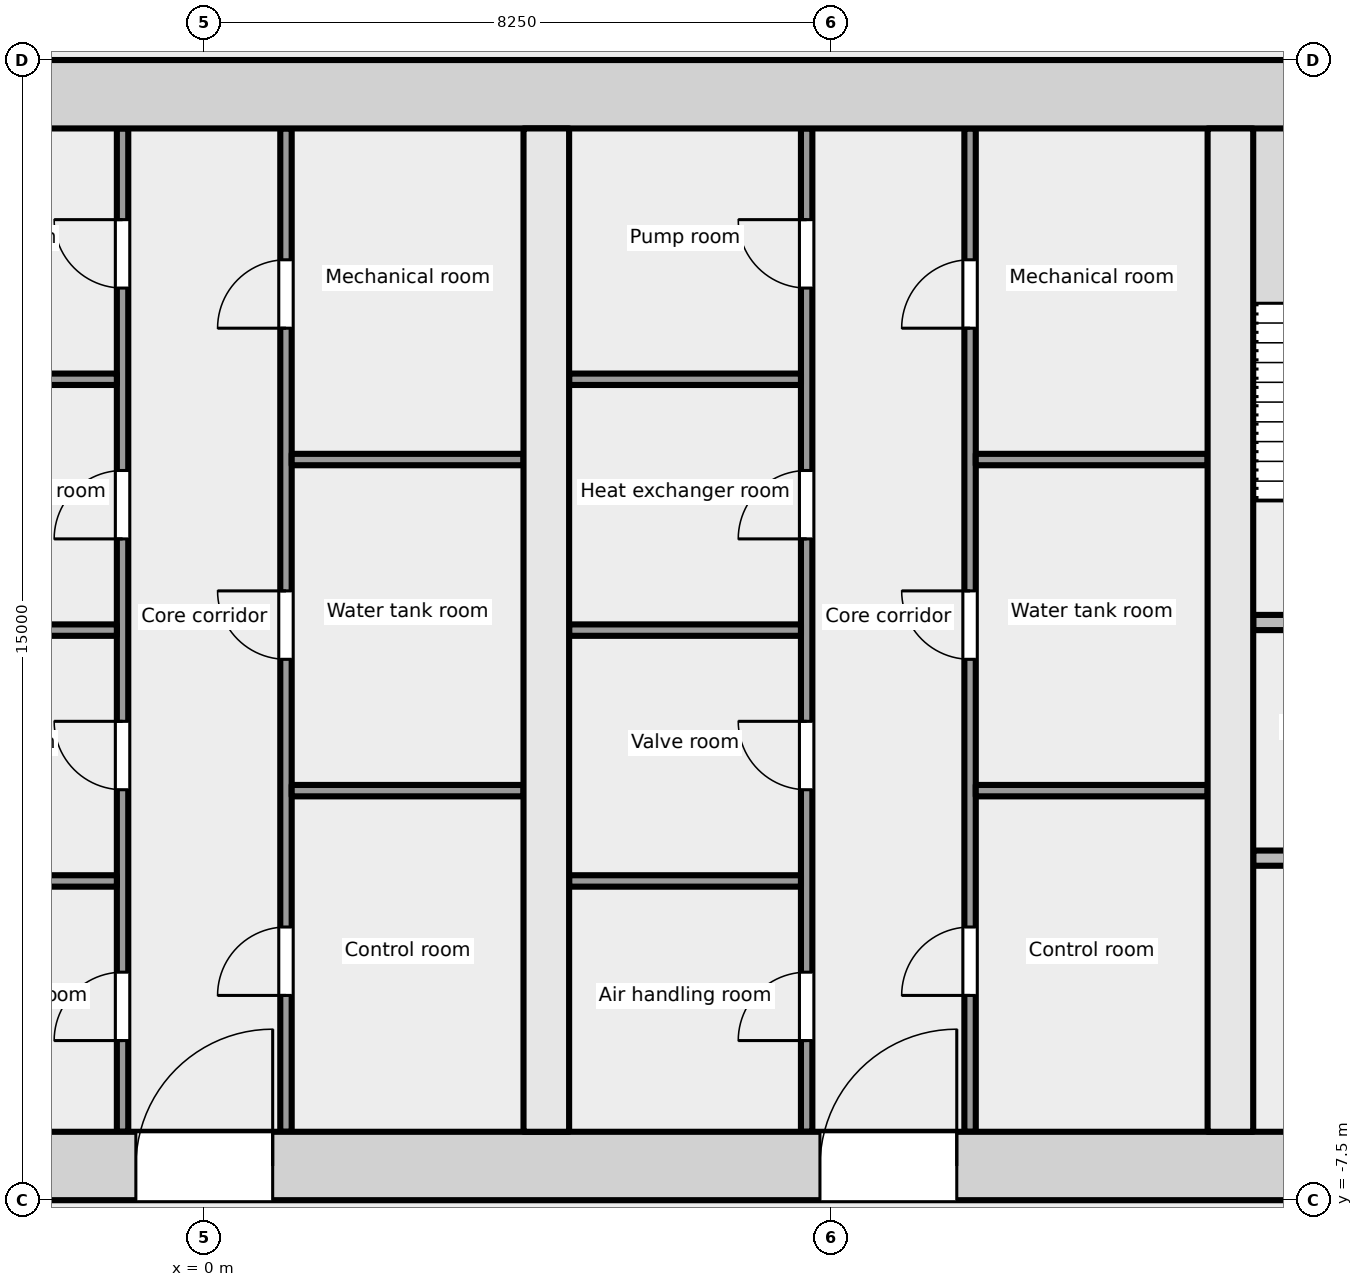
"""IFC4 building model, lengths in metres.
Left out: names, types, materials, properties, quantities, classifications, styles, units other than length and angle.
Written with IfcOpenShell. Run it as: python <this file> out.ifc"""

import sys

from ifc_helpers import new_model, si_unit, direction, frame, frame_2d, origin, place, context, subcontext, project, spatial, rectangle, extrude, element, fill, save


model = new_model("IFC4")
c1 = context("Model", 3, precision=1e-05, world=origin(), true_north=direction((0.0, 1.0)))
c2 = subcontext(c1, "Body", "Model", "MODEL_VIEW")
j1 = project(units=[si_unit("LENGTHUNIT", "METRE"), si_unit("PLANEANGLEUNIT", "RADIAN")], contexts=[c1])
p1 = place(None, origin())
s1 = spatial("IfcSite", under=j1, at=p1, CompositionType="ELEMENT")
p2 = place(p1, origin())
s2 = spatial("IfcBuilding", under=s1, at=p2, CompositionType="ELEMENT")
p3 = place(p2, frame((0.0, 0.0, 292.3)))
s3 = spatial("IfcBuildingStorey", under=s2, at=p3, CompositionType="ELEMENT", Elevation=292.3)
p4 = place(p3, frame((-18.0, -7.05, -0.2), z_axis=(0.0, 0.0, 1.0), x_axis=(1.0, 0.0, 0.0)))
e1 = element("IfcWall", 1, at=p4, inside=s3, PredefinedType="SHEAR", context=c2, shape_type="SweptSolid", body=[
    extrude(rectangle(XDim=36.0, YDim=0.9, at=frame_2d((18.0, 0.0))), origin(), (0.0, 0.0, 1.0), 4.0),
])
p5 = place(p4, frame((8.1, 0.0, 0.2)))
e2 = element("IfcOpeningElement", 2, at=p5, cuts=e1, PredefinedType="OPENING", context=c2, shape_type="SweptSolid", body=[
    extrude(rectangle(XDim=1.8, YDim=2.1, at=frame_2d((0.9, 1.05))), frame((0.0, 0.46, 0.0), z_axis=(0.0, -1.0, 0.0), x_axis=(1.0, 0.0, 0.0)), (0.0, 0.0, 1.0), 0.921),
])
p6 = place(p4, frame((17.1, 0.0, 0.2)))
e3 = element("IfcOpeningElement", 3, at=p6, cuts=e1, PredefinedType="OPENING", context=c2, shape_type="SweptSolid", body=[
    extrude(rectangle(XDim=1.8, YDim=2.1, at=frame_2d((0.9, 1.05))), frame((0.0, 0.46, 0.0), z_axis=(0.0, -1.0, 0.0), x_axis=(1.0, 0.0, 0.0)), (0.0, 0.0, 1.0), 0.921),
])
p7 = place(p4, frame((26.1, 0.0, 0.2)))
e4 = element("IfcOpeningElement", 4, at=p7, cuts=e1, PredefinedType="OPENING", context=c2, shape_type="SweptSolid", body=[
    extrude(rectangle(XDim=1.8, YDim=2.1, at=frame_2d((0.9, 1.05))), frame((0.0, 0.46, 0.0), z_axis=(0.0, -1.0, 0.0), x_axis=(1.0, 0.0, 0.0)), (0.0, 0.0, 1.0), 0.921),
])
p8 = place(p3, frame((-18.0, 7.05, -0.2), z_axis=(0.0, 0.0, 1.0), x_axis=(1.0, 0.0, 0.0)))
e5 = element("IfcWall", 5, at=p8, inside=s3, PredefinedType="SHEAR", context=c2, shape_type="SweptSolid", body=[
    extrude(rectangle(XDim=36.0, YDim=0.9, at=frame_2d((18.0, 0.0))), origin(), (0.0, 0.0, 1.0), 4.0),
])
for number, where, z_axis, x_axis in (
    (6, (4.5, -6.6, -0.2), (0.0, 0.0, 1.0), (0.0, 1.0, 0.0)),
    (7, (13.5, -6.6, -0.2), (0.0, 0.0, 1.0), (0.0, 1.0, 0.0)),
):
    element("IfcWall", number, at=place(p3, frame(where, z_axis=z_axis, x_axis=x_axis)), inside=s3, PredefinedType="SHEAR", context=c2, shape_type="SweptSolid", body=[
        extrude(rectangle(XDim=13.2, YDim=0.6, at=frame_2d((6.6, 0.0))), origin(), (0.0, 0.0, 1.0), 4.0),
    ])
p9 = place(p3, frame((13.8, -3.0, 0.0), z_axis=(0.0, 0.0, 1.0), x_axis=(1.0, 0.0, 0.0)))
e8 = element("IfcWall", 8, at=p9, inside=s3, PredefinedType="PARTITIONING", context=c2, shape_type="SweptSolid", body=[
    extrude(rectangle(XDim=3.3, YDim=0.2, at=frame_2d((1.65, 0.0))), origin(), (0.0, 0.0, 1.0), 3.8),
])
p10 = place(p9, frame((1.1, 0.0, 0.0)))
e9 = element("IfcOpeningElement", 9, at=p10, cuts=e8, PredefinedType="OPENING", context=c2, shape_type="SweptSolid", body=[
    extrude(rectangle(XDim=1.1, YDim=2.1, at=frame_2d((0.55, 1.05))), frame((0.0, 0.111, 0.0), z_axis=(0.0, -1.0, 0.0), x_axis=(1.0, 0.0, 0.0)), (0.0, 0.0, 1.0), 0.221),
])
p11 = place(p3, frame((13.8, 0.1, 0.0), z_axis=(0.0, 0.0, 1.0), x_axis=(1.0, 0.0, 0.0)))
e10 = element("IfcWall", 10, at=p11, inside=s3, PredefinedType="PARTITIONING", context=c2, shape_type="SweptSolid", body=[
    extrude(rectangle(XDim=3.3, YDim=0.2, at=frame_2d((1.65, 0.0))), origin(), (0.0, 0.0, 1.0), 3.8),
])
p12 = place(p11, frame((1.1, 0.0, 0.0)))
e11 = element("IfcOpeningElement", 11, at=p12, cuts=e10, PredefinedType="OPENING", context=c2, shape_type="SweptSolid", body=[
    extrude(rectangle(XDim=1.1, YDim=2.1, at=frame_2d((0.55, 1.05))), frame((0.0, 0.111, 0.0), z_axis=(0.0, -1.0, 0.0), x_axis=(1.0, 0.0, 0.0)), (0.0, 0.0, 1.0), 0.221),
])
p13 = place(p3, frame((-1.075, -6.6, 0.0), z_axis=(0.0, 0.0, 1.0), x_axis=(0.0, 1.0, 0.0)))
e12 = element("IfcWall", 12, at=p13, inside=s3, PredefinedType="PARTITIONING", context=c2, shape_type="SweptSolid", body=[
    extrude(rectangle(XDim=13.2, YDim=0.15, at=frame_2d((6.6, 0.0))), origin(), (0.0, 0.0, 1.0), 3.8),
])
p14 = place(p13, frame((1.2, 0.0, 0.0)))
e13 = element("IfcOpeningElement", 13, at=p14, cuts=e12, PredefinedType="OPENING", context=c2, shape_type="SweptSolid", body=[
    extrude(rectangle(XDim=0.9, YDim=2.1, at=frame_2d((0.45, 1.05))), frame((0.0, 0.085, 0.0), z_axis=(0.0, -1.0, 0.0), x_axis=(1.0, 0.0, 0.0)), (0.0, 0.0, 1.0), 0.171),
])
p15 = place(p13, frame((4.5, 0.0, 0.0)))
e14 = element("IfcOpeningElement", 14, at=p15, cuts=e12, PredefinedType="OPENING", context=c2, shape_type="SweptSolid", body=[
    extrude(rectangle(XDim=0.9, YDim=2.1, at=frame_2d((0.45, 1.05))), frame((0.0, 0.085, 0.0), z_axis=(0.0, -1.0, 0.0), x_axis=(1.0, 0.0, 0.0)), (0.0, 0.0, 1.0), 0.171),
])
p16 = place(p13, frame((7.8, 0.0, 0.0)))
e15 = element("IfcOpeningElement", 15, at=p16, cuts=e12, PredefinedType="OPENING", context=c2, shape_type="SweptSolid", body=[
    extrude(rectangle(XDim=0.9, YDim=2.1, at=frame_2d((0.45, 1.05))), frame((0.0, 0.085, 0.0), z_axis=(0.0, -1.0, 0.0), x_axis=(1.0, 0.0, 0.0)), (0.0, 0.0, 1.0), 0.171),
])
p17 = place(p13, frame((11.1, 0.0, 0.0)))
e16 = element("IfcOpeningElement", 16, at=p17, cuts=e12, PredefinedType="OPENING", context=c2, shape_type="SweptSolid", body=[
    extrude(rectangle(XDim=0.9, YDim=2.1, at=frame_2d((0.45, 1.05))), frame((0.0, 0.085, 0.0), z_axis=(0.0, -1.0, 0.0), x_axis=(1.0, 0.0, 0.0)), (0.0, 0.0, 1.0), 0.171),
])
for number, where, z_axis, x_axis in (
    (17, (-4.2, -3.3, 0.0), (0.0, 0.0, 1.0), (1.0, 0.0, 0.0)),
    (18, (-4.2, 0.0, 0.0), (0.0, 0.0, 1.0), (1.0, 0.0, 0.0)),
    (19, (-4.2, 3.3, 0.0), (0.0, 0.0, 1.0), (1.0, 0.0, 0.0)),
):
    element("IfcWall", number, at=place(p3, frame(where, z_axis=z_axis, x_axis=x_axis)), inside=s3, PredefinedType="PARTITIONING", context=c2, shape_type="SweptSolid", body=[
        extrude(rectangle(XDim=3.05, YDim=0.15, at=frame_2d((1.525, 0.0))), origin(), (0.0, 0.0, 1.0), 3.8),
    ])
p18 = place(p3, frame((1.075, -6.6, 0.0), z_axis=(0.0, 0.0, 1.0), x_axis=(0.0, 1.0, 0.0)))
e20 = element("IfcWall", 20, at=p18, inside=s3, PredefinedType="PARTITIONING", context=c2, shape_type="SweptSolid", body=[
    extrude(rectangle(XDim=13.2, YDim=0.15, at=frame_2d((6.6, 0.0))), origin(), (0.0, 0.0, 1.0), 3.8),
])
p19 = place(p18, frame((1.794, 0.0, 0.0)))
e21 = element("IfcOpeningElement", 21, at=p19, cuts=e20, PredefinedType="OPENING", context=c2, shape_type="SweptSolid", body=[
    extrude(rectangle(XDim=0.9, YDim=2.1, at=frame_2d((0.45, 1.05))), frame((0.0, 0.085, 0.0), z_axis=(0.0, -1.0, 0.0), x_axis=(1.0, 0.0, 0.0)), (0.0, 0.0, 1.0), 0.171),
])
p20 = place(p18, frame((6.216, 0.0, 0.0)))
e22 = element("IfcOpeningElement", 22, at=p20, cuts=e20, PredefinedType="OPENING", context=c2, shape_type="SweptSolid", body=[
    extrude(rectangle(XDim=0.9, YDim=2.1, at=frame_2d((0.45, 1.05))), frame((0.0, 0.085, 0.0), z_axis=(0.0, -1.0, 0.0), x_axis=(1.0, 0.0, 0.0)), (0.0, 0.0, 1.0), 0.171),
])
p21 = place(p18, frame((10.572, 0.0, 0.0)))
e23 = element("IfcOpeningElement", 23, at=p21, cuts=e20, PredefinedType="OPENING", context=c2, shape_type="SweptSolid", body=[
    extrude(rectangle(XDim=0.9, YDim=2.1, at=frame_2d((0.45, 1.05))), frame((0.0, 0.085, 0.0), z_axis=(0.0, -1.0, 0.0), x_axis=(1.0, 0.0, 0.0)), (0.0, 0.0, 1.0), 0.171),
])
for number, where, z_axis, x_axis in (
    (24, (1.15, -2.112, 0.0), (0.0, 0.0, 1.0), (1.0, 0.0, 0.0)),
    (25, (1.15, 2.244, 0.0), (0.0, 0.0, 1.0), (1.0, 0.0, 0.0)),
):
    element("IfcWall", number, at=place(p3, frame(where, z_axis=z_axis, x_axis=x_axis)), inside=s3, PredefinedType="PARTITIONING", context=c2, shape_type="SweptSolid", body=[
        extrude(rectangle(XDim=3.05, YDim=0.15, at=frame_2d((1.525, 0.0))), origin(), (0.0, 0.0, 1.0), 3.8),
    ])
p22 = place(p3, frame((7.925, -6.6, 0.0), z_axis=(0.0, 0.0, 1.0), x_axis=(0.0, 1.0, 0.0)))
e26 = element("IfcWall", 26, at=p22, inside=s3, PredefinedType="PARTITIONING", context=c2, shape_type="SweptSolid", body=[
    extrude(rectangle(XDim=13.2, YDim=0.15, at=frame_2d((6.6, 0.0))), origin(), (0.0, 0.0, 1.0), 3.8),
])
p23 = place(p22, frame((1.2, 0.0, 0.0)))
e27 = element("IfcOpeningElement", 27, at=p23, cuts=e26, PredefinedType="OPENING", context=c2, shape_type="SweptSolid", body=[
    extrude(rectangle(XDim=0.9, YDim=2.1, at=frame_2d((0.45, 1.05))), frame((0.0, 0.085, 0.0), z_axis=(0.0, -1.0, 0.0), x_axis=(1.0, 0.0, 0.0)), (0.0, 0.0, 1.0), 0.171),
])
p24 = place(p22, frame((4.5, 0.0, 0.0)))
e28 = element("IfcOpeningElement", 28, at=p24, cuts=e26, PredefinedType="OPENING", context=c2, shape_type="SweptSolid", body=[
    extrude(rectangle(XDim=0.9, YDim=2.1, at=frame_2d((0.45, 1.05))), frame((0.0, 0.085, 0.0), z_axis=(0.0, -1.0, 0.0), x_axis=(1.0, 0.0, 0.0)), (0.0, 0.0, 1.0), 0.171),
])
p25 = place(p22, frame((7.8, 0.0, 0.0)))
e29 = element("IfcOpeningElement", 29, at=p25, cuts=e26, PredefinedType="OPENING", context=c2, shape_type="SweptSolid", body=[
    extrude(rectangle(XDim=0.9, YDim=2.1, at=frame_2d((0.45, 1.05))), frame((0.0, 0.085, 0.0), z_axis=(0.0, -1.0, 0.0), x_axis=(1.0, 0.0, 0.0)), (0.0, 0.0, 1.0), 0.171),
])
p26 = place(p22, frame((11.1, 0.0, 0.0)))
e30 = element("IfcOpeningElement", 30, at=p26, cuts=e26, PredefinedType="OPENING", context=c2, shape_type="SweptSolid", body=[
    extrude(rectangle(XDim=0.9, YDim=2.1, at=frame_2d((0.45, 1.05))), frame((0.0, 0.085, 0.0), z_axis=(0.0, -1.0, 0.0), x_axis=(1.0, 0.0, 0.0)), (0.0, 0.0, 1.0), 0.171),
])
for number, where, z_axis, x_axis in (
    (31, (4.8, -3.3, 0.0), (0.0, 0.0, 1.0), (1.0, 0.0, 0.0)),
    (32, (4.8, 0.0, 0.0), (0.0, 0.0, 1.0), (1.0, 0.0, 0.0)),
    (33, (4.8, 3.3, 0.0), (0.0, 0.0, 1.0), (1.0, 0.0, 0.0)),
):
    element("IfcWall", number, at=place(p3, frame(where, z_axis=z_axis, x_axis=x_axis)), inside=s3, PredefinedType="PARTITIONING", context=c2, shape_type="SweptSolid", body=[
        extrude(rectangle(XDim=3.05, YDim=0.15, at=frame_2d((1.525, 0.0))), origin(), (0.0, 0.0, 1.0), 3.8),
    ])
p27 = place(p3, frame((10.075, -6.6, 0.0), z_axis=(0.0, 0.0, 1.0), x_axis=(0.0, 1.0, 0.0)))
e34 = element("IfcWall", 34, at=p27, inside=s3, PredefinedType="PARTITIONING", context=c2, shape_type="SweptSolid", body=[
    extrude(rectangle(XDim=13.2, YDim=0.15, at=frame_2d((6.6, 0.0))), origin(), (0.0, 0.0, 1.0), 3.8),
])
p28 = place(p27, frame((1.794, 0.0, 0.0)))
e35 = element("IfcOpeningElement", 35, at=p28, cuts=e34, PredefinedType="OPENING", context=c2, shape_type="SweptSolid", body=[
    extrude(rectangle(XDim=0.9, YDim=2.1, at=frame_2d((0.45, 1.05))), frame((0.0, 0.085, 0.0), z_axis=(0.0, -1.0, 0.0), x_axis=(1.0, 0.0, 0.0)), (0.0, 0.0, 1.0), 0.171),
])
p29 = place(p27, frame((6.216, 0.0, 0.0)))
e36 = element("IfcOpeningElement", 36, at=p29, cuts=e34, PredefinedType="OPENING", context=c2, shape_type="SweptSolid", body=[
    extrude(rectangle(XDim=0.9, YDim=2.1, at=frame_2d((0.45, 1.05))), frame((0.0, 0.085, 0.0), z_axis=(0.0, -1.0, 0.0), x_axis=(1.0, 0.0, 0.0)), (0.0, 0.0, 1.0), 0.171),
])
p30 = place(p27, frame((10.572, 0.0, 0.0)))
e37 = element("IfcOpeningElement", 37, at=p30, cuts=e34, PredefinedType="OPENING", context=c2, shape_type="SweptSolid", body=[
    extrude(rectangle(XDim=0.9, YDim=2.1, at=frame_2d((0.45, 1.05))), frame((0.0, 0.085, 0.0), z_axis=(0.0, -1.0, 0.0), x_axis=(1.0, 0.0, 0.0)), (0.0, 0.0, 1.0), 0.171),
])
for number, where, z_axis, x_axis in (
    (38, (10.15, -2.112, 0.0), (0.0, 0.0, 1.0), (1.0, 0.0, 0.0)),
    (39, (10.15, 2.244, 0.0), (0.0, 0.0, 1.0), (1.0, 0.0, 0.0)),
):
    element("IfcWall", number, at=place(p3, frame(where, z_axis=z_axis, x_axis=x_axis)), inside=s3, PredefinedType="PARTITIONING", context=c2, shape_type="SweptSolid", body=[
        extrude(rectangle(XDim=3.05, YDim=0.15, at=frame_2d((1.525, 0.0))), origin(), (0.0, 0.0, 1.0), 3.8),
    ])
p31 = place(p14, origin())
e40 = element("IfcDoor", 40, at=p31, inside=s3, OperationType="SINGLE_SWING_LEFT", PredefinedType="DOOR", context=c2, shape_type="SweptSolid", body=[
    extrude(rectangle(XDim=0.9, YDim=2.1, at=frame_2d((0.45, 1.05))), frame((0.0, 0.025, 0.0), z_axis=(0.0, -1.0, 0.0), x_axis=(1.0, 0.0, 0.0)), (0.0, 0.0, 1.0), 0.05),
])
fill(e13, e40)
p32 = place(p15, origin())
e41 = element("IfcDoor", 41, at=p32, inside=s3, OperationType="SINGLE_SWING_RIGHT", PredefinedType="DOOR", context=c2, shape_type="SweptSolid", body=[
    extrude(rectangle(XDim=0.9, YDim=2.1, at=frame_2d((0.45, 1.05))), frame((0.0, 0.025, 0.0), z_axis=(0.0, -1.0, 0.0), x_axis=(1.0, 0.0, 0.0)), (0.0, 0.0, 1.0), 0.05),
])
fill(e14, e41)
p33 = place(p16, origin())
e42 = element("IfcDoor", 42, at=p33, inside=s3, OperationType="SINGLE_SWING_LEFT", PredefinedType="DOOR", context=c2, shape_type="SweptSolid", body=[
    extrude(rectangle(XDim=0.9, YDim=2.1, at=frame_2d((0.45, 1.05))), frame((0.0, 0.025, 0.0), z_axis=(0.0, -1.0, 0.0), x_axis=(1.0, 0.0, 0.0)), (0.0, 0.0, 1.0), 0.05),
])
fill(e15, e42)
p34 = place(p17, origin())
e43 = element("IfcDoor", 43, at=p34, inside=s3, OperationType="SINGLE_SWING_RIGHT", PredefinedType="DOOR", context=c2, shape_type="SweptSolid", body=[
    extrude(rectangle(XDim=0.9, YDim=2.1, at=frame_2d((0.45, 1.05))), frame((0.0, 0.025, 0.0), z_axis=(0.0, -1.0, 0.0), x_axis=(1.0, 0.0, 0.0)), (0.0, 0.0, 1.0), 0.05),
])
fill(e16, e43)
p35 = place(p19, origin())
e44 = element("IfcDoor", 44, at=p35, inside=s3, OperationType="SINGLE_SWING_LEFT", PredefinedType="DOOR", context=c2, shape_type="SweptSolid", body=[
    extrude(rectangle(XDim=0.9, YDim=2.1, at=frame_2d((0.45, 1.05))), frame((0.0, 0.025, 0.0), z_axis=(0.0, -1.0, 0.0), x_axis=(1.0, 0.0, 0.0)), (0.0, 0.0, 1.0), 0.05),
])
fill(e21, e44)
p36 = place(p20, origin())
e45 = element("IfcDoor", 45, at=p36, inside=s3, OperationType="SINGLE_SWING_RIGHT", PredefinedType="DOOR", context=c2, shape_type="SweptSolid", body=[
    extrude(rectangle(XDim=0.9, YDim=2.1, at=frame_2d((0.45, 1.05))), frame((0.0, 0.025, 0.0), z_axis=(0.0, -1.0, 0.0), x_axis=(1.0, 0.0, 0.0)), (0.0, 0.0, 1.0), 0.05),
])
fill(e22, e45)
p37 = place(p21, origin())
e46 = element("IfcDoor", 46, at=p37, inside=s3, OperationType="SINGLE_SWING_LEFT", PredefinedType="DOOR", context=c2, shape_type="SweptSolid", body=[
    extrude(rectangle(XDim=0.9, YDim=2.1, at=frame_2d((0.45, 1.05))), frame((0.0, 0.025, 0.0), z_axis=(0.0, -1.0, 0.0), x_axis=(1.0, 0.0, 0.0)), (0.0, 0.0, 1.0), 0.05),
])
fill(e23, e46)
p38 = place(p6, origin())
e47 = element("IfcDoor", 47, at=p38, inside=s3, OperationType="SINGLE_SWING_RIGHT", PredefinedType="DOOR", context=c2, shape_type="SweptSolid", body=[
    extrude(rectangle(XDim=1.8, YDim=2.1, at=frame_2d((0.9, 1.05))), frame((0.0, 0.025, 0.0), z_axis=(0.0, -1.0, 0.0), x_axis=(1.0, 0.0, 0.0)), (0.0, 0.0, 1.0), 0.05),
])
fill(e3, e47)
p39 = place(p23, origin())
e48 = element("IfcDoor", 48, at=p39, inside=s3, OperationType="SINGLE_SWING_LEFT", PredefinedType="DOOR", context=c2, shape_type="SweptSolid", body=[
    extrude(rectangle(XDim=0.9, YDim=2.1, at=frame_2d((0.45, 1.05))), frame((0.0, 0.025, 0.0), z_axis=(0.0, -1.0, 0.0), x_axis=(1.0, 0.0, 0.0)), (0.0, 0.0, 1.0), 0.05),
])
fill(e27, e48)
p40 = place(p24, origin())
e49 = element("IfcDoor", 49, at=p40, inside=s3, OperationType="SINGLE_SWING_RIGHT", PredefinedType="DOOR", context=c2, shape_type="SweptSolid", body=[
    extrude(rectangle(XDim=0.9, YDim=2.1, at=frame_2d((0.45, 1.05))), frame((0.0, 0.025, 0.0), z_axis=(0.0, -1.0, 0.0), x_axis=(1.0, 0.0, 0.0)), (0.0, 0.0, 1.0), 0.05),
])
fill(e28, e49)
p41 = place(p25, origin())
e50 = element("IfcDoor", 50, at=p41, inside=s3, OperationType="SINGLE_SWING_LEFT", PredefinedType="DOOR", context=c2, shape_type="SweptSolid", body=[
    extrude(rectangle(XDim=0.9, YDim=2.1, at=frame_2d((0.45, 1.05))), frame((0.0, 0.025, 0.0), z_axis=(0.0, -1.0, 0.0), x_axis=(1.0, 0.0, 0.0)), (0.0, 0.0, 1.0), 0.05),
])
fill(e29, e50)
p42 = place(p26, origin())
e51 = element("IfcDoor", 51, at=p42, inside=s3, OperationType="SINGLE_SWING_RIGHT", PredefinedType="DOOR", context=c2, shape_type="SweptSolid", body=[
    extrude(rectangle(XDim=0.9, YDim=2.1, at=frame_2d((0.45, 1.05))), frame((0.0, 0.025, 0.0), z_axis=(0.0, -1.0, 0.0), x_axis=(1.0, 0.0, 0.0)), (0.0, 0.0, 1.0), 0.05),
])
fill(e30, e51)
p43 = place(p28, origin())
e52 = element("IfcDoor", 52, at=p43, inside=s3, OperationType="SINGLE_SWING_LEFT", PredefinedType="DOOR", context=c2, shape_type="SweptSolid", body=[
    extrude(rectangle(XDim=0.9, YDim=2.1, at=frame_2d((0.45, 1.05))), frame((0.0, 0.025, 0.0), z_axis=(0.0, -1.0, 0.0), x_axis=(1.0, 0.0, 0.0)), (0.0, 0.0, 1.0), 0.05),
])
fill(e35, e52)
p44 = place(p29, origin())
e53 = element("IfcDoor", 53, at=p44, inside=s3, OperationType="SINGLE_SWING_RIGHT", PredefinedType="DOOR", context=c2, shape_type="SweptSolid", body=[
    extrude(rectangle(XDim=0.9, YDim=2.1, at=frame_2d((0.45, 1.05))), frame((0.0, 0.025, 0.0), z_axis=(0.0, -1.0, 0.0), x_axis=(1.0, 0.0, 0.0)), (0.0, 0.0, 1.0), 0.05),
])
fill(e36, e53)
p45 = place(p30, origin())
e54 = element("IfcDoor", 54, at=p45, inside=s3, OperationType="SINGLE_SWING_LEFT", PredefinedType="DOOR", context=c2, shape_type="SweptSolid", body=[
    extrude(rectangle(XDim=0.9, YDim=2.1, at=frame_2d((0.45, 1.05))), frame((0.0, 0.025, 0.0), z_axis=(0.0, -1.0, 0.0), x_axis=(1.0, 0.0, 0.0)), (0.0, 0.0, 1.0), 0.05),
])
fill(e37, e54)
p46 = place(p7, origin())
e55 = element("IfcDoor", 55, at=p46, inside=s3, OperationType="SINGLE_SWING_RIGHT", PredefinedType="DOOR", context=c2, shape_type="SweptSolid", body=[
    extrude(rectangle(XDim=1.8, YDim=2.1, at=frame_2d((0.9, 1.05))), frame((0.0, 0.025, 0.0), z_axis=(0.0, -1.0, 0.0), x_axis=(1.0, 0.0, 0.0)), (0.0, 0.0, 1.0), 0.05),
])
fill(e4, e55)
save(model, sys.argv[1])
